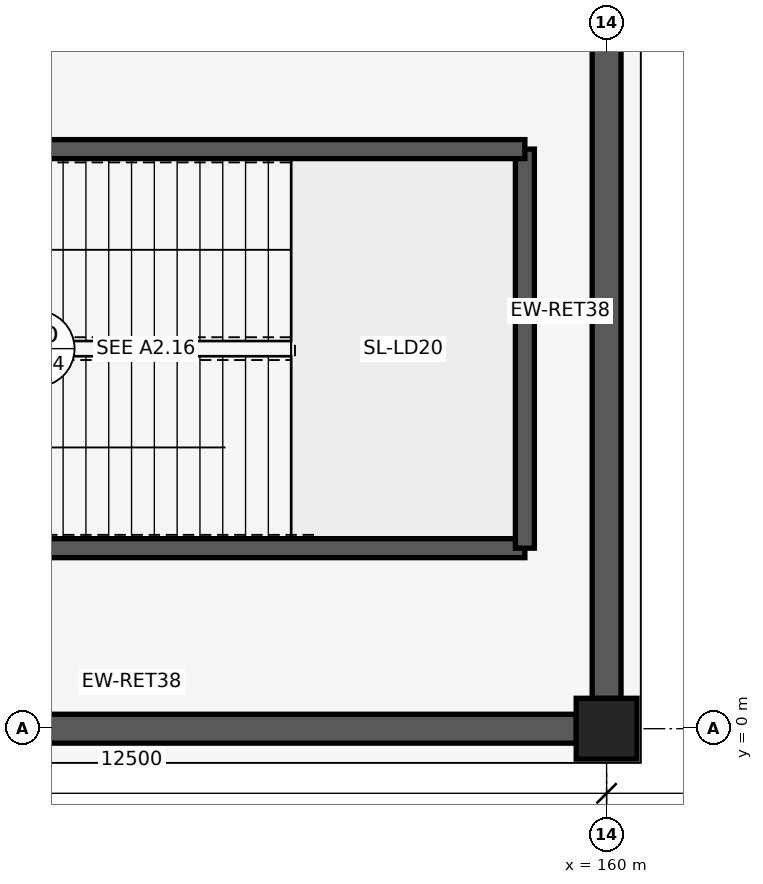
"""IFC4 building model, lengths in metres.
Left out: names, types, materials, properties, quantities, classifications, styles, units other than length and angle.
Written with IfcOpenShell. Run it as: python <this file> out.ifc"""

import sys

from ifc_helpers import new_model, si_unit, direction, frame, frame_2d, origin, origin_2d, place, context, subcontext, project, spatial, rectangle, extrude, element, save


model = new_model("IFC4")
c1 = context("Model", 3, precision=1e-05, world=origin(), true_north=direction((0.0, 1.0)))
c2 = subcontext(c1, "Body", "Model", "MODEL_VIEW")
j1 = project(units=[si_unit("LENGTHUNIT", "METRE"), si_unit("PLANEANGLEUNIT", "RADIAN")], contexts=[c1])
p1 = place(None, origin())
s1 = spatial("IfcSite", under=j1, at=p1, CompositionType="ELEMENT")
p2 = place(p1, origin())
s2 = spatial("IfcBuilding", under=s1, at=p2, CompositionType="ELEMENT")
p3 = place(p2, frame((0.0, 0.0, -5.4)))
s3 = spatial("IfcBuildingStorey", under=s2, at=p3, CompositionType="ELEMENT", Elevation=-5.4)
p4 = place(p3, frame((160.0, 0.0, 0.0), z_axis=(0.0, 0.0, 1.0), x_axis=(1.0, 0.0, 0.0)))
e1 = element("IfcColumn", 1, at=p4, inside=s3, PredefinedType="COLUMN", context=c2, shape_type="SweptSolid", body=[
    extrude(rectangle(XDim=0.8, YDim=0.8, at=origin_2d()), origin(), (0.0, 0.0, 1.0), 5.4),
])
p5 = place(p3, frame((147.897, 0.0, 0.0), z_axis=(0.0, 0.0, 1.0), x_axis=(1.0, 0.0, 0.0)))
e2 = element("IfcWall", 2, at=p5, inside=s3, PredefinedType="SOLIDWALL", context=c2, shape_type="SweptSolid", body=[
    extrude(rectangle(XDim=11.706, YDim=0.38, at=frame_2d((5.853, 0.0))), origin(), (0.0, 0.0, 1.0), 4.43),
])
p6 = place(p3, frame((160.0, 0.397, 0.0), z_axis=(0.0, 0.0, 1.0), x_axis=(0.0, 1.0, 0.0)))
e3 = element("IfcWall", 3, at=p6, inside=s3, PredefinedType="SOLIDWALL", context=c2, shape_type="SweptSolid", body=[
    extrude(rectangle(XDim=10.206, YDim=0.38, at=frame_2d((5.103, 0.0))), origin(), (0.0, 0.0, 1.0), 4.43),
])
p7 = place(p3, frame((148.475, 2.375, 0.0), z_axis=(0.0, 0.0, 1.0), x_axis=(1.0, 0.0, 0.0)))
e4 = element("IfcWall", 4, at=p7, inside=s3, PredefinedType="SHEAR", context=c2, shape_type="SweptSolid", body=[
    extrude(rectangle(XDim=10.45, YDim=0.25, at=frame_2d((5.225, 0.0))), origin(), (0.0, 0.0, 1.0), 5.05),
])
p8 = place(p3, frame((158.925, 2.375, 0.0), z_axis=(0.0, 0.0, 1.0), x_axis=(0.0, 1.0, 0.0)))
e5 = element("IfcWall", 5, at=p8, inside=s3, PredefinedType="SHEAR", context=c2, shape_type="SweptSolid", body=[
    extrude(rectangle(XDim=5.25, YDim=0.25, at=frame_2d((2.625, 0.0))), origin(), (0.0, 0.0, 1.0), 5.05),
])
p9 = place(p3, frame((158.925, 7.625, 0.0), z_axis=(0.0, 0.0, 1.0), x_axis=(-1.0, 0.0, 0.0)))
e6 = element("IfcWall", 6, at=p9, inside=s3, PredefinedType="SHEAR", context=c2, shape_type="SweptSolid", body=[
    extrude(rectangle(XDim=10.45, YDim=0.25, at=frame_2d((5.225, 0.0))), origin(), (0.0, 0.0, 1.0), 5.05),
])
save(model, sys.argv[1])
